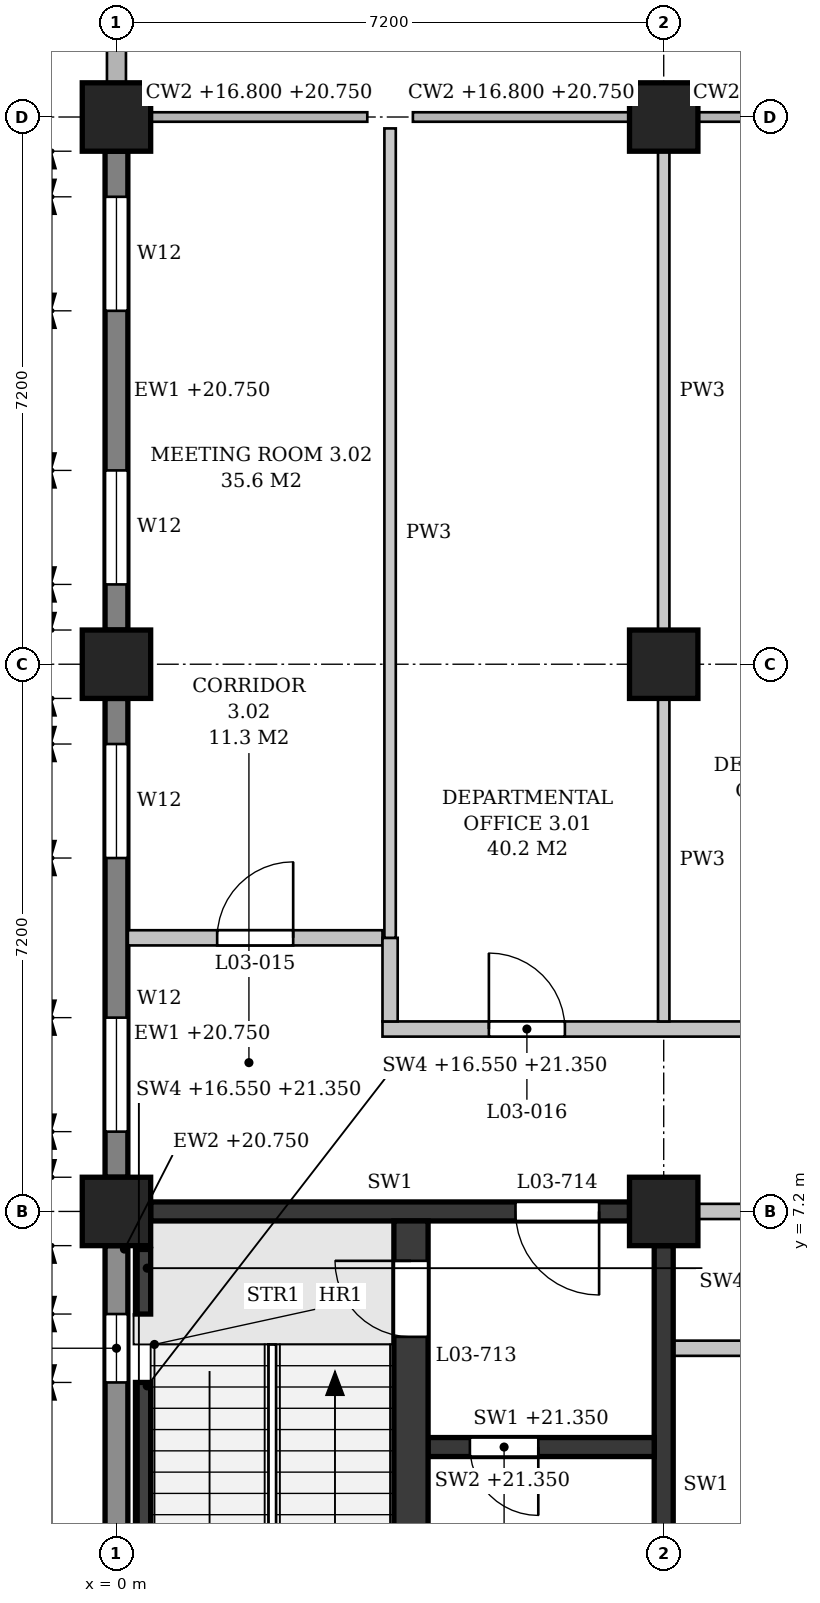
"""IFC4 building model, lengths in metres.
Left out: names, types, materials, properties, quantities, classifications, styles, units other than length and angle.
Written with IfcOpenShell. Run it as: python <this file> out.ifc"""

import sys

from ifc_helpers import new_model, si_unit, direction, frame, frame_2d, origin, origin_2d, place, context, subcontext, project, spatial, polyline, rectangle, outline, extrude, element, fill, save


model = new_model("IFC4")
c1 = context("Model", 3, precision=1e-05, world=origin(), true_north=direction((0.0, 1.0)))
c2 = subcontext(c1, "Body", "Model", "MODEL_VIEW")
j1 = project(units=[si_unit("LENGTHUNIT", "METRE"), si_unit("PLANEANGLEUNIT", "RADIAN")], contexts=[c1])
p1 = place(None, origin())
s1 = spatial("IfcSite", under=j1, at=p1, CompositionType="ELEMENT")
p2 = place(p1, origin())
s2 = spatial("IfcBuilding", under=s1, at=p2, CompositionType="ELEMENT")
p3 = place(p2, frame((0.0, 0.0, 16.8)))
s3 = spatial("IfcBuildingStorey", under=s2, at=p3, CompositionType="ELEMENT", Elevation=16.8)
for number, where, z_axis, x_axis in (
    (1, (0.0, 7.2, 0.0), (0.0, 0.0, 1.0), (1.0, 0.0, 0.0)),
    (2, (0.0, 14.4, 0.0), (0.0, 0.0, 1.0), (1.0, 0.0, 0.0)),
    (3, (0.0, 21.6, 0.0), (0.0, 0.0, 1.0), (1.0, 0.0, 0.0)),
    (4, (7.2, 7.2, 0.0), (0.0, 0.0, 1.0), (1.0, 0.0, 0.0)),
    (5, (7.2, 14.4, 0.0), (0.0, 0.0, 1.0), (1.0, 0.0, 0.0)),
    (6, (7.2, 21.6, 0.0), (0.0, 0.0, 1.0), (1.0, 0.0, 0.0)),
):
    element("IfcColumn", number, at=place(p3, frame(where, z_axis=z_axis, x_axis=x_axis)), inside=s3, PredefinedType="COLUMN", context=c2, shape_type="SweptSolid", body=[
        extrude(rectangle(XDim=0.9, YDim=0.9, at=origin_2d()), origin(), (0.0, 0.0, 1.0), 4.8),
    ])
p4 = place(p3, frame((0.0, 0.45, 0.0), z_axis=(0.0, 0.0, 1.0), x_axis=(0.0, 1.0, 0.0)))
e7 = element("IfcWall", 7, at=p4, inside=s3, PredefinedType="STANDARD", context=c2, shape_type="SweptSolid", body=[
    extrude(rectangle(XDim=6.3, YDim=0.3, at=frame_2d((3.15, 0.0))), origin(), (0.0, 0.0, 1.0), 3.95),
])
p5 = place(p4, frame((0.9, 0.0, 0.9)))
e8 = element("IfcOpeningElement", 8, at=p5, cuts=e7, PredefinedType="OPENING", context=c2, shape_type="SweptSolid", body=[
    extrude(outline(polyline([(0.0, 0.0), (0.9, 0.0), (0.9, 2.05), (0.45, 2.5), (0.0, 2.05), (0.0, 0.0)])), frame((0.0, 0.16, 0.0), z_axis=(0.0, -1.0, 0.0), x_axis=(1.0, 0.0, 0.0)), (0.0, 0.0, 1.0), 0.32),
])
p6 = place(p4, frame((4.5, 0.0, 0.9)))
e9 = element("IfcOpeningElement", 9, at=p6, cuts=e7, PredefinedType="OPENING", context=c2, shape_type="SweptSolid", body=[
    extrude(outline(polyline([(0.0, 0.0), (0.9, 0.0), (0.9, 2.05), (0.45, 2.5), (0.0, 2.05), (0.0, 0.0)])), frame((0.0, 0.16, 0.0), z_axis=(0.0, -1.0, 0.0), x_axis=(1.0, 0.0, 0.0)), (0.0, 0.0, 1.0), 0.32),
])
p7 = place(p3, frame((0.0, 7.65, 0.0), z_axis=(0.0, 0.0, 1.0), x_axis=(0.0, 1.0, 0.0)))
e10 = element("IfcWall", 10, at=p7, inside=s3, PredefinedType="STANDARD", context=c2, shape_type="SweptSolid", body=[
    extrude(rectangle(XDim=6.3, YDim=0.3, at=frame_2d((3.15, 0.0))), origin(), (0.0, 0.0, 1.0), 3.95),
])
p8 = place(p7, frame((0.6, 0.0, 0.9)))
e11 = element("IfcOpeningElement", 11, at=p8, cuts=e10, PredefinedType="OPENING", context=c2, shape_type="SweptSolid", body=[
    extrude(outline(polyline([(0.0, 0.0), (1.5, 0.0), (1.5, 1.75), (0.75, 2.5), (0.0, 1.75), (0.0, 0.0)])), frame((0.0, 0.16, 0.0), z_axis=(0.0, -1.0, 0.0), x_axis=(1.0, 0.0, 0.0)), (0.0, 0.0, 1.0), 0.32),
])
p9 = place(p7, frame((4.2, 0.0, 0.9)))
e12 = element("IfcOpeningElement", 12, at=p9, cuts=e10, PredefinedType="OPENING", context=c2, shape_type="SweptSolid", body=[
    extrude(outline(polyline([(0.0, 0.0), (1.5, 0.0), (1.5, 1.75), (0.75, 2.5), (0.0, 1.75), (0.0, 0.0)])), frame((0.0, 0.16, 0.0), z_axis=(0.0, -1.0, 0.0), x_axis=(1.0, 0.0, 0.0)), (0.0, 0.0, 1.0), 0.32),
])
p10 = place(p3, frame((0.0, 14.85, 0.0), z_axis=(0.0, 0.0, 1.0), x_axis=(0.0, 1.0, 0.0)))
e13 = element("IfcWall", 13, at=p10, inside=s3, PredefinedType="STANDARD", context=c2, shape_type="SweptSolid", body=[
    extrude(rectangle(XDim=6.3, YDim=0.3, at=frame_2d((3.15, 0.0))), origin(), (0.0, 0.0, 1.0), 3.95),
])
p11 = place(p10, frame((0.6, 0.0, 0.9)))
e14 = element("IfcOpeningElement", 14, at=p11, cuts=e13, PredefinedType="OPENING", context=c2, shape_type="SweptSolid", body=[
    extrude(outline(polyline([(0.0, 0.0), (1.5, 0.0), (1.5, 1.75), (0.75, 2.5), (0.0, 1.75), (0.0, 0.0)])), frame((0.0, 0.16, 0.0), z_axis=(0.0, -1.0, 0.0), x_axis=(1.0, 0.0, 0.0)), (0.0, 0.0, 1.0), 0.32),
])
p12 = place(p10, frame((4.2, 0.0, 0.9)))
e15 = element("IfcOpeningElement", 15, at=p12, cuts=e13, PredefinedType="OPENING", context=c2, shape_type="SweptSolid", body=[
    extrude(outline(polyline([(0.0, 0.0), (1.5, 0.0), (1.5, 1.75), (0.75, 2.5), (0.0, 1.75), (0.0, 0.0)])), frame((0.0, 0.16, 0.0), z_axis=(0.0, -1.0, 0.0), x_axis=(1.0, 0.0, 0.0)), (0.0, 0.0, 1.0), 0.32),
])
p13 = place(p3, frame((0.45, 7.2, 0.0), z_axis=(0.0, 0.0, 1.0), x_axis=(1.0, 0.0, 0.0)))
e16 = element("IfcWall", 16, at=p13, inside=s3, PredefinedType="SHEAR", context=c2, shape_type="SweptSolid", body=[
    extrude(rectangle(XDim=6.3, YDim=0.25, at=frame_2d((3.15, 0.0))), origin(), (0.0, 0.0, 1.0), 3.8),
])
p14 = place(p13, frame((4.8, 0.0, 0.0)))
e17 = element("IfcOpeningElement", 17, at=p14, cuts=e16, PredefinedType="OPENING", context=c2, shape_type="SweptSolid", body=[
    extrude(rectangle(XDim=1.1, YDim=2.1, at=frame_2d((0.55, 1.05))), frame((0.0, 0.135, 0.0), z_axis=(0.0, -1.0, 0.0), x_axis=(1.0, 0.0, 0.0)), (0.0, 0.0, 1.0), 0.27),
])
p15 = place(p3, frame((7.2, 0.45, 0.0), z_axis=(0.0, 0.0, 1.0), x_axis=(0.0, 1.0, 0.0)))
e18 = element("IfcWall", 18, at=p15, inside=s3, PredefinedType="SHEAR", context=c2, shape_type="SweptSolid", body=[
    extrude(rectangle(XDim=6.3, YDim=0.25, at=frame_2d((3.15, 0.0))), origin(), (0.0, 0.0, 1.0), 3.8),
])
p16 = place(p3, frame((0.35, 2.25, -0.25), z_axis=(0.0, 0.0, 1.0), x_axis=(0.0, 1.0, 0.0)))
e19 = element("IfcWall", 19, at=p16, inside=s3, PredefinedType="SHEAR", context=c2, shape_type="SweptSolid", body=[
    extrude(rectangle(XDim=2.7, YDim=0.2, at=frame_2d((1.35, 0.0))), origin(), (0.0, 0.0, 1.0), 4.8),
])
p17 = place(p3, frame((0.35, 5.85, -0.25), z_axis=(0.0, 0.0, 1.0), x_axis=(0.0, 1.0, 0.0)))
e20 = element("IfcWall", 20, at=p17, inside=s3, PredefinedType="SHEAR", context=c2, shape_type="SweptSolid", body=[
    extrude(rectangle(XDim=0.85, YDim=0.2, at=frame_2d((0.425, 0.0))), origin(), (0.0, 0.0, 1.0), 4.8),
])
p18 = place(p3, frame((3.875, 0.225, 0.0), z_axis=(0.0, 0.0, 1.0), x_axis=(0.0, 1.0, 0.0)))
e21 = element("IfcWall", 21, at=p18, inside=s3, PredefinedType="SHEAR", context=c2, shape_type="SweptSolid", body=[
    extrude(rectangle(XDim=6.85, YDim=0.45, at=frame_2d((3.425, 0.0))), origin(), (0.0, 0.0, 1.0), 4.55),
])
p19 = place(p18, frame((5.325, 0.0, 0.0)))
e22 = element("IfcOpeningElement", 22, at=p19, cuts=e21, PredefinedType="OPENING", context=c2, shape_type="SweptSolid", body=[
    extrude(rectangle(XDim=1.0, YDim=2.1, at=frame_2d((0.5, 1.05))), frame((0.0, 0.235, 0.0), z_axis=(0.0, -1.0, 0.0), x_axis=(1.0, 0.0, 0.0)), (0.0, 0.0, 1.0), 0.47),
])
p20 = place(p3, frame((4.1, 4.1, 0.0), z_axis=(0.0, 0.0, 1.0), x_axis=(1.0, 0.0, 0.0)))
e23 = element("IfcWall", 23, at=p20, inside=s3, PredefinedType="SHEAR", context=c2, shape_type="SweptSolid", body=[
    extrude(rectangle(XDim=2.975, YDim=0.25, at=frame_2d((1.487, 0.0))), origin(), (0.0, 0.0, 1.0), 4.55),
])
p21 = place(p20, frame((0.55, 0.0, 0.0)))
e24 = element("IfcOpeningElement", 24, at=p21, cuts=e23, PredefinedType="OPENING", context=c2, shape_type="SweptSolid", body=[
    extrude(rectangle(XDim=0.9, YDim=2.1, at=frame_2d((0.45, 1.05))), frame((0.0, 0.135, 0.0), z_axis=(0.0, -1.0, 0.0), x_axis=(1.0, 0.0, 0.0)), (0.0, 0.0, 1.0), 0.27),
])
p22 = place(p3, frame((7.325, 5.4, 0.0), z_axis=(0.0, 0.0, 1.0), x_axis=(1.0, 0.0, 0.0)))
e25 = element("IfcWall", 25, at=p22, inside=s3, PredefinedType="PARTITIONING", context=c2, shape_type="SweptSolid", body=[
    extrude(outline(polyline([(0.0, 0.0), (14.15, 0.0), (14.15, 3.8), (14.025, 3.8), (14.025, 4.55), (7.325, 4.55), (7.325, 3.8), (6.825, 3.8), (6.825, 4.55), (0.125, 4.55), (0.125, 3.8), (0.0, 3.8), (0.0, 0.0)])), frame((0.0, 0.1, 0.0), z_axis=(0.0, -1.0, 0.0), x_axis=(1.0, 0.0, 0.0)), (0.0, 0.0, 1.0), 0.2),
])
p23 = place(p22, frame((1.238, 0.0, 0.0)))
e26 = element("IfcOpeningElement", 26, at=p23, cuts=e25, PredefinedType="OPENING", context=c2, shape_type="SweptSolid", body=[
    extrude(rectangle(XDim=1.0, YDim=2.1, at=frame_2d((0.5, 1.05))), frame((0.0, 0.11, 0.0), z_axis=(0.0, -1.0, 0.0), x_axis=(1.0, 0.0, 0.0)), (0.0, 0.0, 1.0), 0.22),
])
p24 = place(p22, frame((4.775, 0.0, 0.0)))
e27 = element("IfcOpeningElement", 27, at=p24, cuts=e25, PredefinedType="OPENING", context=c2, shape_type="SweptSolid", body=[
    extrude(rectangle(XDim=1.0, YDim=2.1, at=frame_2d((0.5, 1.05))), frame((0.0, 0.11, 0.0), z_axis=(0.0, -1.0, 0.0), x_axis=(1.0, 0.0, 0.0)), (0.0, 0.0, 1.0), 0.22),
])
p25 = place(p22, frame((8.375, 0.0, 0.0)))
e28 = element("IfcOpeningElement", 28, at=p25, cuts=e25, PredefinedType="OPENING", context=c2, shape_type="SweptSolid", body=[
    extrude(rectangle(XDim=1.0, YDim=2.1, at=frame_2d((0.5, 1.05))), frame((0.0, 0.11, 0.0), z_axis=(0.0, -1.0, 0.0), x_axis=(1.0, 0.0, 0.0)), (0.0, 0.0, 1.0), 0.22),
])
p26 = place(p22, frame((11.913, 0.0, 0.0)))
e29 = element("IfcOpeningElement", 29, at=p26, cuts=e25, PredefinedType="OPENING", context=c2, shape_type="SweptSolid", body=[
    extrude(rectangle(XDim=1.0, YDim=2.1, at=frame_2d((0.5, 1.05))), frame((0.0, 0.11, 0.0), z_axis=(0.0, -1.0, 0.0), x_axis=(1.0, 0.0, 0.0)), (0.0, 0.0, 1.0), 0.22),
])
p27 = place(p3, frame((7.65, 7.2, 0.0), z_axis=(0.0, 0.0, 1.0), x_axis=(1.0, 0.0, 0.0)))
e30 = element("IfcWall", 30, at=p27, inside=s3, PredefinedType="PARTITIONING", context=c2, shape_type="SweptSolid", body=[
    extrude(rectangle(XDim=6.3, YDim=0.2, at=frame_2d((3.15, 0.0))), origin(), (0.0, 0.0, 1.0), 3.8),
])
p28 = place(p27, frame((2.65, 0.0, 0.0)))
e31 = element("IfcOpeningElement", 31, at=p28, cuts=e30, PredefinedType="OPENING", context=c2, shape_type="SweptSolid", body=[
    extrude(rectangle(XDim=1.0, YDim=2.1, at=frame_2d((0.5, 1.05))), frame((0.0, 0.11, 0.0), z_axis=(0.0, -1.0, 0.0), x_axis=(1.0, 0.0, 0.0)), (0.0, 0.0, 1.0), 0.22),
])
p29 = place(p3, frame((3.5, 9.6, 0.0), z_axis=(0.0, 0.0, 1.0), x_axis=(1.0, 0.0, 0.0)))
e32 = element("IfcWall", 32, at=p29, inside=s3, PredefinedType="PARTITIONING", context=c2, shape_type="SweptSolid", body=[
    extrude(outline(polyline([(0.0, 0.0), (14.6, 0.0), (14.6, 4.55), (11.15, 4.55), (11.15, 3.8), (10.65, 3.8), (10.65, 4.55), (3.95, 4.55), (3.95, 3.8), (3.45, 3.8), (3.45, 4.55), (0.0, 4.55), (0.0, 0.0)])), frame((0.0, 0.1, 0.0), z_axis=(0.0, -1.0, 0.0), x_axis=(1.0, 0.0, 0.0)), (0.0, 0.0, 1.0), 0.2),
])
p30 = place(p29, frame((1.4, 0.0, 0.0)))
e33 = element("IfcOpeningElement", 33, at=p30, cuts=e32, PredefinedType="OPENING", context=c2, shape_type="SweptSolid", body=[
    extrude(rectangle(XDim=1.0, YDim=2.1, at=frame_2d((0.5, 1.05))), frame((0.0, 0.11, 0.0), z_axis=(0.0, -1.0, 0.0), x_axis=(1.0, 0.0, 0.0)), (0.0, 0.0, 1.0), 0.22),
])
p31 = place(p29, frame((5.0, 0.0, 0.0)))
e34 = element("IfcOpeningElement", 34, at=p31, cuts=e32, PredefinedType="OPENING", context=c2, shape_type="SweptSolid", body=[
    extrude(rectangle(XDim=1.0, YDim=2.1, at=frame_2d((0.5, 1.05))), frame((0.0, 0.11, 0.0), z_axis=(0.0, -1.0, 0.0), x_axis=(1.0, 0.0, 0.0)), (0.0, 0.0, 1.0), 0.22),
])
p32 = place(p29, frame((10.4, 0.0, 0.0)))
e35 = element("IfcOpeningElement", 35, at=p32, cuts=e32, PredefinedType="OPENING", context=c2, shape_type="SweptSolid", body=[
    extrude(rectangle(XDim=1.0, YDim=2.1, at=frame_2d((0.5, 1.05))), frame((0.0, 0.11, 0.0), z_axis=(0.0, -1.0, 0.0), x_axis=(1.0, 0.0, 0.0)), (0.0, 0.0, 1.0), 0.22),
])
p33 = place(p3, frame((0.15, 10.8, 0.0), z_axis=(0.0, 0.0, 1.0), x_axis=(1.0, 0.0, 0.0)))
e36 = element("IfcWall", 36, at=p33, inside=s3, PredefinedType="PARTITIONING", context=c2, shape_type="SweptSolid", body=[
    extrude(outline(polyline([(0.0, 0.0), (3.35, 0.0), (3.35, 4.55), (0.1, 4.55), (0.1, 3.95), (0.0, 3.95), (0.0, 0.0)])), frame((0.0, 0.1, 0.0), z_axis=(0.0, -1.0, 0.0), x_axis=(1.0, 0.0, 0.0)), (0.0, 0.0, 1.0), 0.2),
])
p34 = place(p33, frame((1.175, 0.0, 0.0)))
e37 = element("IfcOpeningElement", 37, at=p34, cuts=e36, PredefinedType="OPENING", context=c2, shape_type="SweptSolid", body=[
    extrude(rectangle(XDim=1.0, YDim=2.1, at=frame_2d((0.5, 1.05))), frame((0.0, 0.11, 0.0), z_axis=(0.0, -1.0, 0.0), x_axis=(1.0, 0.0, 0.0)), (0.0, 0.0, 1.0), 0.22),
])
p35 = place(p3, frame((3.6, 9.7, 0.0), z_axis=(0.0, 0.0, 1.0), x_axis=(0.0, 1.0, 0.0)))
e38 = element("IfcWall", 38, at=p35, inside=s3, PredefinedType="PARTITIONING", context=c2, shape_type="SweptSolid", body=[
    extrude(rectangle(XDim=1.1, YDim=0.2, at=frame_2d((0.55, 0.0))), origin(), (0.0, 0.0, 1.0), 4.55),
])
p36 = place(p3, frame((3.6, 10.8, 0.0), z_axis=(0.0, 0.0, 1.0), x_axis=(0.0, 1.0, 0.0)))
e39 = element("IfcWall", 39, at=p36, inside=s3, PredefinedType="PARTITIONING", context=c2, shape_type="SweptSolid", body=[
    extrude(rectangle(XDim=10.65, YDim=0.15, at=frame_2d((5.325, 0.0))), origin(), (0.0, 0.0, 1.0), 3.8),
])
p37 = place(p3, frame((7.2, 9.7, 0.0), z_axis=(0.0, 0.0, 1.0), x_axis=(0.0, 1.0, 0.0)))
e40 = element("IfcWall", 40, at=p37, inside=s3, PredefinedType="PARTITIONING", context=c2, shape_type="SweptSolid", body=[
    extrude(rectangle(XDim=4.25, YDim=0.15, at=frame_2d((2.125, 0.0))), origin(), (0.0, 0.0, 1.0), 3.8),
])
p38 = place(p3, frame((7.2, 14.85, 0.0), z_axis=(0.0, 0.0, 1.0), x_axis=(0.0, 1.0, 0.0)))
e41 = element("IfcWall", 41, at=p38, inside=s3, PredefinedType="PARTITIONING", context=c2, shape_type="SweptSolid", body=[
    extrude(rectangle(XDim=6.3, YDim=0.15, at=frame_2d((3.15, 0.0))), origin(), (0.0, 0.0, 1.0), 3.8),
])
p39 = place(p6, origin())
e42 = element("IfcWindow", 42, at=p39, inside=s3, PartitioningType="SINGLE_PANEL", PredefinedType="WINDOW", context=c2, shape_type="SweptSolid", body=[
    extrude(outline(polyline([(0.0, 0.0), (0.9, 0.0), (0.9, 2.05), (0.45, 2.5), (0.0, 2.05), (0.0, 0.0)])), frame((0.0, 0.03, 0.0), z_axis=(0.0, -1.0, 0.0), x_axis=(1.0, 0.0, 0.0)), (0.0, 0.0, 1.0), 0.06),
])
fill(e9, e42)
p40 = place(p8, origin())
e43 = element("IfcWindow", 43, at=p40, inside=s3, PartitioningType="SINGLE_PANEL", PredefinedType="WINDOW", context=c2, shape_type="SweptSolid", body=[
    extrude(outline(polyline([(0.0, 0.0), (1.5, 0.0), (1.5, 1.75), (0.75, 2.5), (0.0, 1.75), (0.0, 0.0)])), frame((0.0, 0.03, 0.0), z_axis=(0.0, -1.0, 0.0), x_axis=(1.0, 0.0, 0.0)), (0.0, 0.0, 1.0), 0.06),
])
fill(e11, e43)
p41 = place(p9, origin())
e44 = element("IfcWindow", 44, at=p41, inside=s3, PartitioningType="SINGLE_PANEL", PredefinedType="WINDOW", context=c2, shape_type="SweptSolid", body=[
    extrude(outline(polyline([(0.0, 0.0), (1.5, 0.0), (1.5, 1.75), (0.75, 2.5), (0.0, 1.75), (0.0, 0.0)])), frame((0.0, 0.03, 0.0), z_axis=(0.0, -1.0, 0.0), x_axis=(1.0, 0.0, 0.0)), (0.0, 0.0, 1.0), 0.06),
])
fill(e12, e44)
p42 = place(p11, origin())
e45 = element("IfcWindow", 45, at=p42, inside=s3, PartitioningType="SINGLE_PANEL", PredefinedType="WINDOW", context=c2, shape_type="SweptSolid", body=[
    extrude(outline(polyline([(0.0, 0.0), (1.5, 0.0), (1.5, 1.75), (0.75, 2.5), (0.0, 1.75), (0.0, 0.0)])), frame((0.0, 0.03, 0.0), z_axis=(0.0, -1.0, 0.0), x_axis=(1.0, 0.0, 0.0)), (0.0, 0.0, 1.0), 0.06),
])
fill(e14, e45)
p43 = place(p12, origin())
e46 = element("IfcWindow", 46, at=p43, inside=s3, PartitioningType="SINGLE_PANEL", PredefinedType="WINDOW", context=c2, shape_type="SweptSolid", body=[
    extrude(outline(polyline([(0.0, 0.0), (1.5, 0.0), (1.5, 1.75), (0.75, 2.5), (0.0, 1.75), (0.0, 0.0)])), frame((0.0, 0.03, 0.0), z_axis=(0.0, -1.0, 0.0), x_axis=(1.0, 0.0, 0.0)), (0.0, 0.0, 1.0), 0.06),
])
fill(e15, e46)
p44 = place(p19, origin())
e47 = element("IfcDoor", 47, at=p44, inside=s3, OperationType="SINGLE_SWING_RIGHT", PredefinedType="DOOR", context=c2, shape_type="SweptSolid", body=[
    extrude(rectangle(XDim=1.0, YDim=2.1, at=frame_2d((0.5, 1.05))), frame((0.0, 0.025, 0.0), z_axis=(0.0, -1.0, 0.0), x_axis=(1.0, 0.0, 0.0)), (0.0, 0.0, 1.0), 0.05),
])
fill(e22, e47)
p45 = place(p14, frame((1.1, 0.0, 0.0), z_axis=(0.0, 0.0, 1.0), x_axis=(-1.0, 0.0, 0.0)))
e48 = element("IfcDoor", 48, at=p45, inside=s3, OperationType="SINGLE_SWING_LEFT", PredefinedType="DOOR", context=c2, shape_type="SweptSolid", body=[
    extrude(rectangle(XDim=1.1, YDim=2.1, at=frame_2d((0.55, 1.05))), frame((0.0, 0.025, 0.0), z_axis=(0.0, -1.0, 0.0), x_axis=(1.0, 0.0, 0.0)), (0.0, 0.0, 1.0), 0.05),
])
fill(e17, e48)
p46 = place(p21, frame((0.9, 0.0, 0.0), z_axis=(0.0, 0.0, 1.0), x_axis=(-1.0, 0.0, 0.0)))
e49 = element("IfcDoor", 49, at=p46, inside=s3, OperationType="SINGLE_SWING_LEFT", PredefinedType="DOOR", context=c2, shape_type="SweptSolid", body=[
    extrude(rectangle(XDim=0.9, YDim=2.1, at=frame_2d((0.45, 1.05))), frame((0.0, 0.025, 0.0), z_axis=(0.0, -1.0, 0.0), x_axis=(1.0, 0.0, 0.0)), (0.0, 0.0, 1.0), 0.05),
])
fill(e24, e49)
p47 = place(p34, origin())
e50 = element("IfcDoor", 50, at=p47, inside=s3, OperationType="SINGLE_SWING_RIGHT", PredefinedType="DOOR", context=c2, shape_type="SweptSolid", body=[
    extrude(rectangle(XDim=1.0, YDim=2.1, at=frame_2d((0.5, 1.05))), frame((0.0, 0.025, 0.0), z_axis=(0.0, -1.0, 0.0), x_axis=(1.0, 0.0, 0.0)), (0.0, 0.0, 1.0), 0.05),
])
fill(e37, e50)
p48 = place(p30, origin())
e51 = element("IfcDoor", 51, at=p48, inside=s3, OperationType="SINGLE_SWING_LEFT", PredefinedType="DOOR", context=c2, shape_type="SweptSolid", body=[
    extrude(rectangle(XDim=1.0, YDim=2.1, at=frame_2d((0.5, 1.05))), frame((0.0, 0.025, 0.0), z_axis=(0.0, -1.0, 0.0), x_axis=(1.0, 0.0, 0.0)), (0.0, 0.0, 1.0), 0.05),
])
fill(e33, e51)
save(model, sys.argv[1])
